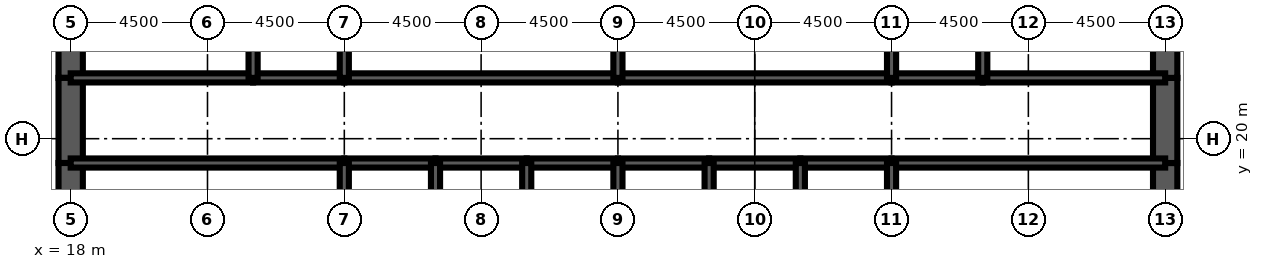
"""IFC4 building model, lengths in metres.
Left out: names, types, materials, properties, quantities, classifications, styles, units other than length and angle.
Written with IfcOpenShell. Run it as: python <this file> out.ifc"""

import sys

from ifc_helpers import new_model, si_unit, direction, frame, frame_2d, origin, place, context, subcontext, project, spatial, rectangle, extrude, element, fill, save


model = new_model("IFC4")
c1 = context("Model", 3, precision=1e-05, world=origin(), true_north=direction((0.0, 1.0)))
c2 = subcontext(c1, "Body", "Model", "MODEL_VIEW")
j1 = project(units=[si_unit("LENGTHUNIT", "METRE"), si_unit("PLANEANGLEUNIT", "RADIAN")], contexts=[c1])
p1 = place(None, origin())
s1 = spatial("IfcSite", under=j1, at=p1, CompositionType="ELEMENT")
p2 = place(p1, origin())
s2 = spatial("IfcBuilding", under=s1, at=p2, CompositionType="ELEMENT")
p3 = place(p2, frame((0.0, 0.0, 211.0)))
s3 = spatial("IfcBuildingStorey", under=s2, at=p3, CompositionType="ELEMENT", Elevation=211.0)
p4 = place(p3, frame((18.0, 26.0, 0.0), z_axis=(0.0, 0.0, 1.0), x_axis=(0.0, -1.0, 0.0)))
e1 = element("IfcWall", 1, at=p4, inside=s3, PredefinedType="SHEAR", context=c2, shape_type="SweptSolid", body=[
    extrude(rectangle(XDim=4.0, YDim=0.8, at=frame_2d((2.0, 0.0))), origin(), (0.0, 0.0, 1.0), 4.2),
])
p5 = place(p3, frame((18.0, 22.0, 0.0), z_axis=(0.0, 0.0, 1.0), x_axis=(0.0, -1.0, 0.0)))
e2 = element("IfcWall", 2, at=p5, inside=s3, PredefinedType="SHEAR", context=c2, shape_type="SweptSolid", body=[
    extrude(rectangle(XDim=2.8, YDim=0.8, at=frame_2d((1.4, 0.0))), origin(), (0.0, 0.0, 1.0), 4.2),
])
p6 = place(p5, frame((0.6, 0.0, 0.0)))
e3 = element("IfcOpeningElement", 3, at=p6, cuts=e2, PredefinedType="OPENING", context=c2, shape_type="SweptSolid", body=[
    extrude(rectangle(XDim=1.8, YDim=2.1, at=frame_2d((0.9, 1.05))), frame((0.0, 0.41, 0.0), z_axis=(0.0, -1.0, 0.0), x_axis=(1.0, 0.0, 0.0)), (0.0, 0.0, 1.0), 0.82),
])
for number, where, z_axis, x_axis in (
    (4, (18.0, 19.2, 0.0), (0.0, 0.0, 1.0), (0.0, -1.0, 0.0)),
    (5, (54.0, 16.0, 0.0), (0.0, 0.0, 1.0), (0.0, 1.0, 0.0)),
):
    element("IfcWall", number, at=place(p3, frame(where, z_axis=z_axis, x_axis=x_axis)), inside=s3, PredefinedType="SHEAR", context=c2, shape_type="SweptSolid", body=[
        extrude(rectangle(XDim=3.2, YDim=0.8, at=frame_2d((1.6, 0.0))), origin(), (0.0, 0.0, 1.0), 4.2),
    ])
p7 = place(p3, frame((54.0, 19.2, 0.0), z_axis=(0.0, 0.0, 1.0), x_axis=(0.0, 1.0, 0.0)))
e6 = element("IfcWall", 6, at=p7, inside=s3, PredefinedType="SHEAR", context=c2, shape_type="SweptSolid", body=[
    extrude(rectangle(XDim=2.8, YDim=0.8, at=frame_2d((1.4, 0.0))), origin(), (0.0, 0.0, 1.0), 4.2),
])
p8 = place(p7, frame((0.4, 0.0, 0.0)))
e7 = element("IfcOpeningElement", 7, at=p8, cuts=e6, PredefinedType="OPENING", context=c2, shape_type="SweptSolid", body=[
    extrude(rectangle(XDim=1.8, YDim=2.1, at=frame_2d((0.9, 1.05))), frame((0.0, 0.41, 0.0), z_axis=(0.0, -1.0, 0.0), x_axis=(1.0, 0.0, 0.0)), (0.0, 0.0, 1.0), 0.82),
])
p9 = place(p3, frame((54.0, 22.0, 0.0), z_axis=(0.0, 0.0, 1.0), x_axis=(0.0, 1.0, 0.0)))
e8 = element("IfcWall", 8, at=p9, inside=s3, PredefinedType="SHEAR", context=c2, shape_type="SweptSolid", body=[
    extrude(rectangle(XDim=4.0, YDim=0.8, at=frame_2d((2.0, 0.0))), origin(), (0.0, 0.0, 1.0), 4.2),
])
p10 = place(p3, frame((18.0, 19.2, 0.0), z_axis=(0.0, 0.0, 1.0), x_axis=(1.0, 0.0, 0.0)))
e9 = element("IfcWall", 9, at=p10, inside=s3, PredefinedType="SOLIDWALL", context=c2, shape_type="SweptSolid", body=[
    extrude(rectangle(XDim=9.0, YDim=0.3, at=frame_2d((4.5, 0.0))), origin(), (0.0, 0.0, 1.0), 4.2),
])
p11 = place(p10, frame((0.65, 0.0, 0.0)))
e10 = element("IfcOpeningElement", 10, at=p11, cuts=e9, PredefinedType="OPENING", context=c2, shape_type="SweptSolid", body=[
    extrude(rectangle(XDim=1.0, YDim=2.1, at=frame_2d((0.5, 1.05))), frame((0.0, 0.16, 0.0), z_axis=(0.0, -1.0, 0.0), x_axis=(1.0, 0.0, 0.0)), (0.0, 0.0, 1.0), 0.32),
])
p12 = place(p3, frame((27.0, 19.2, 0.0), z_axis=(0.0, 0.0, 1.0), x_axis=(1.0, 0.0, 0.0)))
e11 = element("IfcWall", 11, at=p12, inside=s3, PredefinedType="SOLIDWALL", context=c2, shape_type="SweptSolid", body=[
    extrude(rectangle(XDim=3.0, YDim=0.3, at=frame_2d((1.5, 0.0))), origin(), (0.0, 0.0, 1.0), 4.2),
])
p13 = place(p12, frame((0.95, 0.0, 0.0)))
e12 = element("IfcOpeningElement", 12, at=p13, cuts=e11, PredefinedType="OPENING", context=c2, shape_type="SweptSolid", body=[
    extrude(rectangle(XDim=1.1, YDim=2.2, at=frame_2d((0.55, 1.1))), frame((0.0, 0.16, 0.0), z_axis=(0.0, -1.0, 0.0), x_axis=(1.0, 0.0, 0.0)), (0.0, 0.0, 1.0), 0.32),
])
p14 = place(p3, frame((30.0, 19.2, 0.0), z_axis=(0.0, 0.0, 1.0), x_axis=(1.0, 0.0, 0.0)))
e13 = element("IfcWall", 13, at=p14, inside=s3, PredefinedType="SOLIDWALL", context=c2, shape_type="SweptSolid", body=[
    extrude(rectangle(XDim=3.0, YDim=0.3, at=frame_2d((1.5, 0.0))), origin(), (0.0, 0.0, 1.0), 4.2),
])
p15 = place(p14, frame((0.95, 0.0, 0.0)))
e14 = element("IfcOpeningElement", 14, at=p15, cuts=e13, PredefinedType="OPENING", context=c2, shape_type="SweptSolid", body=[
    extrude(rectangle(XDim=1.1, YDim=2.2, at=frame_2d((0.55, 1.1))), frame((0.0, 0.16, 0.0), z_axis=(0.0, -1.0, 0.0), x_axis=(1.0, 0.0, 0.0)), (0.0, 0.0, 1.0), 0.32),
])
p16 = place(p3, frame((33.0, 19.2, 0.0), z_axis=(0.0, 0.0, 1.0), x_axis=(1.0, 0.0, 0.0)))
e15 = element("IfcWall", 15, at=p16, inside=s3, PredefinedType="SOLIDWALL", context=c2, shape_type="SweptSolid", body=[
    extrude(rectangle(XDim=3.0, YDim=0.3, at=frame_2d((1.5, 0.0))), origin(), (0.0, 0.0, 1.0), 4.2),
])
p17 = place(p16, frame((0.95, 0.0, 0.0)))
e16 = element("IfcOpeningElement", 16, at=p17, cuts=e15, PredefinedType="OPENING", context=c2, shape_type="SweptSolid", body=[
    extrude(rectangle(XDim=1.1, YDim=2.2, at=frame_2d((0.55, 1.1))), frame((0.0, 0.16, 0.0), z_axis=(0.0, -1.0, 0.0), x_axis=(1.0, 0.0, 0.0)), (0.0, 0.0, 1.0), 0.32),
])
p18 = place(p3, frame((36.0, 19.2, 0.0), z_axis=(0.0, 0.0, 1.0), x_axis=(1.0, 0.0, 0.0)))
e17 = element("IfcWall", 17, at=p18, inside=s3, PredefinedType="SOLIDWALL", context=c2, shape_type="SweptSolid", body=[
    extrude(rectangle(XDim=3.0, YDim=0.3, at=frame_2d((1.5, 0.0))), origin(), (0.0, 0.0, 1.0), 4.2),
])
p19 = place(p18, frame((0.95, 0.0, 0.0)))
e18 = element("IfcOpeningElement", 18, at=p19, cuts=e17, PredefinedType="OPENING", context=c2, shape_type="SweptSolid", body=[
    extrude(rectangle(XDim=1.1, YDim=2.2, at=frame_2d((0.55, 1.1))), frame((0.0, 0.16, 0.0), z_axis=(0.0, -1.0, 0.0), x_axis=(1.0, 0.0, 0.0)), (0.0, 0.0, 1.0), 0.32),
])
p20 = place(p3, frame((39.0, 19.2, 0.0), z_axis=(0.0, 0.0, 1.0), x_axis=(1.0, 0.0, 0.0)))
e19 = element("IfcWall", 19, at=p20, inside=s3, PredefinedType="SOLIDWALL", context=c2, shape_type="SweptSolid", body=[
    extrude(rectangle(XDim=3.0, YDim=0.3, at=frame_2d((1.5, 0.0))), origin(), (0.0, 0.0, 1.0), 4.2),
])
p21 = place(p20, frame((1.0, 0.0, 0.0)))
e20 = element("IfcOpeningElement", 20, at=p21, cuts=e19, PredefinedType="OPENING", context=c2, shape_type="SweptSolid", body=[
    extrude(rectangle(XDim=1.0, YDim=2.1, at=frame_2d((0.5, 1.05))), frame((0.0, 0.16, 0.0), z_axis=(0.0, -1.0, 0.0), x_axis=(1.0, 0.0, 0.0)), (0.0, 0.0, 1.0), 0.32),
])
p22 = place(p3, frame((42.0, 19.2, 0.0), z_axis=(0.0, 0.0, 1.0), x_axis=(1.0, 0.0, 0.0)))
e21 = element("IfcWall", 21, at=p22, inside=s3, PredefinedType="SOLIDWALL", context=c2, shape_type="SweptSolid", body=[
    extrude(rectangle(XDim=3.0, YDim=0.3, at=frame_2d((1.5, 0.0))), origin(), (0.0, 0.0, 1.0), 4.2),
])
p23 = place(p22, frame((1.0, 0.0, 0.0)))
e22 = element("IfcOpeningElement", 22, at=p23, cuts=e21, PredefinedType="OPENING", context=c2, shape_type="SweptSolid", body=[
    extrude(rectangle(XDim=1.0, YDim=2.1, at=frame_2d((0.5, 1.05))), frame((0.0, 0.16, 0.0), z_axis=(0.0, -1.0, 0.0), x_axis=(1.0, 0.0, 0.0)), (0.0, 0.0, 1.0), 0.32),
])
p24 = place(p3, frame((45.0, 19.2, 0.0), z_axis=(0.0, 0.0, 1.0), x_axis=(1.0, 0.0, 0.0)))
e23 = element("IfcWall", 23, at=p24, inside=s3, PredefinedType="SOLIDWALL", context=c2, shape_type="SweptSolid", body=[
    extrude(rectangle(XDim=9.0, YDim=0.3, at=frame_2d((4.5, 0.0))), origin(), (0.0, 0.0, 1.0), 4.2),
])
p25 = place(p24, frame((7.35, 0.0, 0.0)))
e24 = element("IfcOpeningElement", 24, at=p25, cuts=e23, PredefinedType="OPENING", context=c2, shape_type="SweptSolid", body=[
    extrude(rectangle(XDim=1.0, YDim=2.1, at=frame_2d((0.5, 1.05))), frame((0.0, 0.16, 0.0), z_axis=(0.0, -1.0, 0.0), x_axis=(1.0, 0.0, 0.0)), (0.0, 0.0, 1.0), 0.32),
])
p26 = place(p3, frame((18.0, 22.0, 0.0), z_axis=(0.0, 0.0, 1.0), x_axis=(1.0, 0.0, 0.0)))
e25 = element("IfcWall", 25, at=p26, inside=s3, PredefinedType="SOLIDWALL", context=c2, shape_type="SweptSolid", body=[
    extrude(rectangle(XDim=6.0, YDim=0.3, at=frame_2d((3.0, 0.0))), origin(), (0.0, 0.0, 1.0), 4.2),
])
p27 = place(p26, frame((2.0, 0.0, 0.0)))
e26 = element("IfcOpeningElement", 26, at=p27, cuts=e25, PredefinedType="OPENING", context=c2, shape_type="SweptSolid", body=[
    extrude(rectangle(XDim=1.0, YDim=2.1, at=frame_2d((0.5, 1.05))), frame((0.0, 0.16, 0.0), z_axis=(0.0, -1.0, 0.0), x_axis=(1.0, 0.0, 0.0)), (0.0, 0.0, 1.0), 0.32),
])
p28 = place(p3, frame((24.0, 22.0, 0.0), z_axis=(0.0, 0.0, 1.0), x_axis=(1.0, 0.0, 0.0)))
e27 = element("IfcWall", 27, at=p28, inside=s3, PredefinedType="SOLIDWALL", context=c2, shape_type="SweptSolid", body=[
    extrude(rectangle(XDim=3.0, YDim=0.3, at=frame_2d((1.5, 0.0))), origin(), (0.0, 0.0, 1.0), 4.2),
])
p29 = place(p28, frame((1.0, 0.0, 0.0)))
e28 = element("IfcOpeningElement", 28, at=p29, cuts=e27, PredefinedType="OPENING", context=c2, shape_type="SweptSolid", body=[
    extrude(rectangle(XDim=1.0, YDim=2.1, at=frame_2d((0.5, 1.05))), frame((0.0, 0.16, 0.0), z_axis=(0.0, -1.0, 0.0), x_axis=(1.0, 0.0, 0.0)), (0.0, 0.0, 1.0), 0.32),
])
p30 = place(p3, frame((27.0, 22.0, 0.0), z_axis=(0.0, 0.0, 1.0), x_axis=(1.0, 0.0, 0.0)))
e29 = element("IfcWall", 29, at=p30, inside=s3, PredefinedType="SOLIDWALL", context=c2, shape_type="SweptSolid", body=[
    extrude(rectangle(XDim=9.0, YDim=0.3, at=frame_2d((4.5, 0.0))), origin(), (0.0, 0.0, 1.0), 4.2),
])
p31 = place(p30, frame((4.0, 0.0, 0.0)))
e30 = element("IfcOpeningElement", 30, at=p31, cuts=e29, PredefinedType="OPENING", context=c2, shape_type="SweptSolid", body=[
    extrude(rectangle(XDim=1.0, YDim=2.1, at=frame_2d((0.5, 1.05))), frame((0.0, 0.16, 0.0), z_axis=(0.0, -1.0, 0.0), x_axis=(1.0, 0.0, 0.0)), (0.0, 0.0, 1.0), 0.32),
])
p32 = place(p3, frame((36.0, 22.0, 0.0), z_axis=(0.0, 0.0, 1.0), x_axis=(1.0, 0.0, 0.0)))
e31 = element("IfcWall", 31, at=p32, inside=s3, PredefinedType="SOLIDWALL", context=c2, shape_type="SweptSolid", body=[
    extrude(rectangle(XDim=9.0, YDim=0.3, at=frame_2d((4.5, 0.0))), origin(), (0.0, 0.0, 1.0), 4.2),
])
p33 = place(p32, frame((4.0, 0.0, 0.0)))
e32 = element("IfcOpeningElement", 32, at=p33, cuts=e31, PredefinedType="OPENING", context=c2, shape_type="SweptSolid", body=[
    extrude(rectangle(XDim=1.0, YDim=2.1, at=frame_2d((0.5, 1.05))), frame((0.0, 0.16, 0.0), z_axis=(0.0, -1.0, 0.0), x_axis=(1.0, 0.0, 0.0)), (0.0, 0.0, 1.0), 0.32),
])
p34 = place(p3, frame((45.0, 22.0, 0.0), z_axis=(0.0, 0.0, 1.0), x_axis=(1.0, 0.0, 0.0)))
e33 = element("IfcWall", 33, at=p34, inside=s3, PredefinedType="SOLIDWALL", context=c2, shape_type="SweptSolid", body=[
    extrude(rectangle(XDim=3.0, YDim=0.3, at=frame_2d((1.5, 0.0))), origin(), (0.0, 0.0, 1.0), 4.2),
])
p35 = place(p34, frame((1.0, 0.0, 0.0)))
e34 = element("IfcOpeningElement", 34, at=p35, cuts=e33, PredefinedType="OPENING", context=c2, shape_type="SweptSolid", body=[
    extrude(rectangle(XDim=1.0, YDim=2.1, at=frame_2d((0.5, 1.05))), frame((0.0, 0.16, 0.0), z_axis=(0.0, -1.0, 0.0), x_axis=(1.0, 0.0, 0.0)), (0.0, 0.0, 1.0), 0.32),
])
p36 = place(p3, frame((48.0, 22.0, 0.0), z_axis=(0.0, 0.0, 1.0), x_axis=(1.0, 0.0, 0.0)))
e35 = element("IfcWall", 35, at=p36, inside=s3, PredefinedType="SOLIDWALL", context=c2, shape_type="SweptSolid", body=[
    extrude(rectangle(XDim=6.0, YDim=0.3, at=frame_2d((3.0, 0.0))), origin(), (0.0, 0.0, 1.0), 4.2),
])
p37 = place(p36, frame((2.0, 0.0, 0.0)))
e36 = element("IfcOpeningElement", 36, at=p37, cuts=e35, PredefinedType="OPENING", context=c2, shape_type="SweptSolid", body=[
    extrude(rectangle(XDim=1.0, YDim=2.1, at=frame_2d((0.5, 1.05))), frame((0.0, 0.16, 0.0), z_axis=(0.0, -1.0, 0.0), x_axis=(1.0, 0.0, 0.0)), (0.0, 0.0, 1.0), 0.32),
])
p38 = place(p36, frame((4.2, 0.0, 0.0)))
e37 = element("IfcOpeningElement", 37, at=p38, cuts=e35, PredefinedType="OPENING", context=c2, shape_type="SweptSolid", body=[
    extrude(rectangle(XDim=1.0, YDim=2.1, at=frame_2d((0.5, 1.05))), frame((0.0, 0.16, 0.0), z_axis=(0.0, -1.0, 0.0), x_axis=(1.0, 0.0, 0.0)), (0.0, 0.0, 1.0), 0.32),
])
for number, where, z_axis, x_axis in (
    (38, (27.0, 16.0, 0.0), (0.0, 0.0, 1.0), (0.0, 1.0, 0.0)),
    (39, (30.0, 16.0, 0.0), (0.0, 0.0, 1.0), (0.0, 1.0, 0.0)),
    (40, (33.0, 16.0, 0.0), (0.0, 0.0, 1.0), (0.0, 1.0, 0.0)),
    (41, (36.0, 16.0, 0.0), (0.0, 0.0, 1.0), (0.0, 1.0, 0.0)),
    (42, (39.0, 16.0, 0.0), (0.0, 0.0, 1.0), (0.0, 1.0, 0.0)),
    (43, (42.0, 16.0, 0.0), (0.0, 0.0, 1.0), (0.0, 1.0, 0.0)),
    (44, (45.0, 16.0, 0.0), (0.0, 0.0, 1.0), (0.0, 1.0, 0.0)),
):
    element("IfcWall", number, at=place(p3, frame(where, z_axis=z_axis, x_axis=x_axis)), inside=s3, PredefinedType="SOLIDWALL", context=c2, shape_type="SweptSolid", body=[
        extrude(rectangle(XDim=3.2, YDim=0.3, at=frame_2d((1.6, 0.0))), origin(), (0.0, 0.0, 1.0), 4.2),
    ])
for number, where, z_axis, x_axis in (
    (45, (24.0, 22.0, 0.0), (0.0, 0.0, 1.0), (0.0, 1.0, 0.0)),
    (46, (27.0, 22.0, 0.0), (0.0, 0.0, 1.0), (0.0, 1.0, 0.0)),
    (47, (36.0, 22.0, 0.0), (0.0, 0.0, 1.0), (0.0, 1.0, 0.0)),
    (48, (45.0, 22.0, 0.0), (0.0, 0.0, 1.0), (0.0, 1.0, 0.0)),
    (49, (48.0, 22.0, 0.0), (0.0, 0.0, 1.0), (0.0, 1.0, 0.0)),
):
    element("IfcWall", number, at=place(p3, frame(where, z_axis=z_axis, x_axis=x_axis)), inside=s3, PredefinedType="SOLIDWALL", context=c2, shape_type="SweptSolid", body=[
        extrude(rectangle(XDim=4.0, YDim=0.3, at=frame_2d((2.0, 0.0))), origin(), (0.0, 0.0, 1.0), 4.2),
    ])
p39 = place(p3, frame((51.725, 22.15, 0.0), z_axis=(0.0, 0.0, 1.0), x_axis=(0.0, 1.0, 0.0)))
e50 = element("IfcWall", 50, at=p39, inside=s3, PredefinedType="PARTITIONING", context=c2, shape_type="SweptSolid", body=[
    extrude(rectangle(XDim=3.7, YDim=0.15, at=frame_2d((1.85, 0.0))), origin(), (0.0, 0.0, 1.0), 3.0),
])
p40 = place(p13, origin())
e51 = element("IfcDoor", 51, at=p40, inside=s3, OperationType="DOUBLE_DOOR_SLIDING", PredefinedType="USERDEFINED", context=c2, shape_type="SweptSolid", body=[
    extrude(rectangle(XDim=1.1, YDim=2.2, at=frame_2d((0.55, 1.1))), frame((0.0, 0.025, 0.0), z_axis=(0.0, -1.0, 0.0), x_axis=(1.0, 0.0, 0.0)), (0.0, 0.0, 1.0), 0.05),
])
fill(e12, e51)
p41 = place(p15, origin())
e52 = element("IfcDoor", 52, at=p41, inside=s3, OperationType="DOUBLE_DOOR_SLIDING", PredefinedType="USERDEFINED", context=c2, shape_type="SweptSolid", body=[
    extrude(rectangle(XDim=1.1, YDim=2.2, at=frame_2d((0.55, 1.1))), frame((0.0, 0.025, 0.0), z_axis=(0.0, -1.0, 0.0), x_axis=(1.0, 0.0, 0.0)), (0.0, 0.0, 1.0), 0.05),
])
fill(e14, e52)
p42 = place(p17, origin())
e53 = element("IfcDoor", 53, at=p42, inside=s3, OperationType="DOUBLE_DOOR_SLIDING", PredefinedType="USERDEFINED", context=c2, shape_type="SweptSolid", body=[
    extrude(rectangle(XDim=1.1, YDim=2.2, at=frame_2d((0.55, 1.1))), frame((0.0, 0.025, 0.0), z_axis=(0.0, -1.0, 0.0), x_axis=(1.0, 0.0, 0.0)), (0.0, 0.0, 1.0), 0.05),
])
fill(e16, e53)
p43 = place(p19, origin())
e54 = element("IfcDoor", 54, at=p43, inside=s3, OperationType="DOUBLE_DOOR_SLIDING", PredefinedType="USERDEFINED", context=c2, shape_type="SweptSolid", body=[
    extrude(rectangle(XDim=1.1, YDim=2.2, at=frame_2d((0.55, 1.1))), frame((0.0, 0.025, 0.0), z_axis=(0.0, -1.0, 0.0), x_axis=(1.0, 0.0, 0.0)), (0.0, 0.0, 1.0), 0.05),
])
fill(e18, e54)
p44 = place(p11, origin())
e55 = element("IfcDoor", 55, at=p44, inside=s3, OperationType="SINGLE_SWING_LEFT", PredefinedType="DOOR", context=c2, shape_type="SweptSolid", body=[
    extrude(rectangle(XDim=1.0, YDim=2.1, at=frame_2d((0.5, 1.05))), frame((0.0, 0.025, 0.0), z_axis=(0.0, -1.0, 0.0), x_axis=(1.0, 0.0, 0.0)), (0.0, 0.0, 1.0), 0.05),
])
fill(e10, e55)
p45 = place(p25, origin())
e56 = element("IfcDoor", 56, at=p45, inside=s3, OperationType="SINGLE_SWING_RIGHT", PredefinedType="DOOR", context=c2, shape_type="SweptSolid", body=[
    extrude(rectangle(XDim=1.0, YDim=2.1, at=frame_2d((0.5, 1.05))), frame((0.0, 0.025, 0.0), z_axis=(0.0, -1.0, 0.0), x_axis=(1.0, 0.0, 0.0)), (0.0, 0.0, 1.0), 0.05),
])
fill(e24, e56)
p46 = place(p6, origin())
e57 = element("IfcDoor", 57, at=p46, inside=s3, OperationType="SINGLE_SWING_LEFT", PredefinedType="DOOR", context=c2, shape_type="SweptSolid", body=[
    extrude(rectangle(XDim=1.8, YDim=2.1, at=frame_2d((0.9, 1.05))), frame((0.0, 0.4, 0.0), z_axis=(0.0, -1.0, 0.0), x_axis=(1.0, 0.0, 0.0)), (0.0, 0.0, 1.0), 0.8),
])
fill(e3, e57)
p47 = place(p8, origin())
e58 = element("IfcDoor", 58, at=p47, inside=s3, OperationType="SINGLE_SWING_LEFT", PredefinedType="DOOR", context=c2, shape_type="SweptSolid", body=[
    extrude(rectangle(XDim=1.8, YDim=2.1, at=frame_2d((0.9, 1.05))), frame((0.0, 0.4, 0.0), z_axis=(0.0, -1.0, 0.0), x_axis=(1.0, 0.0, 0.0)), (0.0, 0.0, 1.0), 0.8),
])
fill(e7, e58)
p48 = place(p27, origin())
e59 = element("IfcDoor", 59, at=p48, inside=s3, OperationType="SINGLE_SWING_LEFT", PredefinedType="DOOR", context=c2, shape_type="SweptSolid", body=[
    extrude(rectangle(XDim=1.0, YDim=2.1, at=frame_2d((0.5, 1.05))), frame((0.0, 0.025, 0.0), z_axis=(0.0, -1.0, 0.0), x_axis=(1.0, 0.0, 0.0)), (0.0, 0.0, 1.0), 0.05),
])
fill(e26, e59)
p49 = place(p29, origin())
e60 = element("IfcDoor", 60, at=p49, inside=s3, OperationType="SINGLE_SWING_LEFT", PredefinedType="DOOR", context=c2, shape_type="SweptSolid", body=[
    extrude(rectangle(XDim=1.0, YDim=2.1, at=frame_2d((0.5, 1.05))), frame((0.0, 0.025, 0.0), z_axis=(0.0, -1.0, 0.0), x_axis=(1.0, 0.0, 0.0)), (0.0, 0.0, 1.0), 0.05),
])
fill(e28, e60)
p50 = place(p31, origin())
e61 = element("IfcDoor", 61, at=p50, inside=s3, OperationType="SINGLE_SWING_LEFT", PredefinedType="DOOR", context=c2, shape_type="SweptSolid", body=[
    extrude(rectangle(XDim=1.0, YDim=2.1, at=frame_2d((0.5, 1.05))), frame((0.0, 0.025, 0.0), z_axis=(0.0, -1.0, 0.0), x_axis=(1.0, 0.0, 0.0)), (0.0, 0.0, 1.0), 0.05),
])
fill(e30, e61)
p51 = place(p33, origin())
e62 = element("IfcDoor", 62, at=p51, inside=s3, OperationType="SINGLE_SWING_LEFT", PredefinedType="DOOR", context=c2, shape_type="SweptSolid", body=[
    extrude(rectangle(XDim=1.0, YDim=2.1, at=frame_2d((0.5, 1.05))), frame((0.0, 0.025, 0.0), z_axis=(0.0, -1.0, 0.0), x_axis=(1.0, 0.0, 0.0)), (0.0, 0.0, 1.0), 0.05),
])
fill(e32, e62)
p52 = place(p35, origin())
e63 = element("IfcDoor", 63, at=p52, inside=s3, OperationType="SINGLE_SWING_LEFT", PredefinedType="DOOR", context=c2, shape_type="SweptSolid", body=[
    extrude(rectangle(XDim=1.0, YDim=2.1, at=frame_2d((0.5, 1.05))), frame((0.0, 0.025, 0.0), z_axis=(0.0, -1.0, 0.0), x_axis=(1.0, 0.0, 0.0)), (0.0, 0.0, 1.0), 0.05),
])
fill(e34, e63)
p53 = place(p37, origin())
e64 = element("IfcDoor", 64, at=p53, inside=s3, OperationType="SINGLE_SWING_LEFT", PredefinedType="DOOR", context=c2, shape_type="SweptSolid", body=[
    extrude(rectangle(XDim=1.0, YDim=2.1, at=frame_2d((0.5, 1.05))), frame((0.0, 0.025, 0.0), z_axis=(0.0, -1.0, 0.0), x_axis=(1.0, 0.0, 0.0)), (0.0, 0.0, 1.0), 0.05),
])
fill(e36, e64)
p54 = place(p38, origin())
e65 = element("IfcDoor", 65, at=p54, inside=s3, OperationType="SINGLE_SWING_RIGHT", PredefinedType="DOOR", context=c2, shape_type="SweptSolid", body=[
    extrude(rectangle(XDim=1.0, YDim=2.1, at=frame_2d((0.5, 1.05))), frame((0.0, 0.025, 0.0), z_axis=(0.0, -1.0, 0.0), x_axis=(1.0, 0.0, 0.0)), (0.0, 0.0, 1.0), 0.05),
])
fill(e37, e65)
p55 = place(p21, origin())
e66 = element("IfcDoor", 66, at=p55, inside=s3, OperationType="SINGLE_SWING_LEFT", PredefinedType="DOOR", context=c2, shape_type="SweptSolid", body=[
    extrude(rectangle(XDim=1.0, YDim=2.1, at=frame_2d((0.5, 1.05))), frame((0.0, 0.025, 0.0), z_axis=(0.0, -1.0, 0.0), x_axis=(1.0, 0.0, 0.0)), (0.0, 0.0, 1.0), 0.05),
])
fill(e20, e66)
p56 = place(p23, origin())
e67 = element("IfcDoor", 67, at=p56, inside=s3, OperationType="SINGLE_SWING_LEFT", PredefinedType="DOOR", context=c2, shape_type="SweptSolid", body=[
    extrude(rectangle(XDim=1.0, YDim=2.1, at=frame_2d((0.5, 1.05))), frame((0.0, 0.025, 0.0), z_axis=(0.0, -1.0, 0.0), x_axis=(1.0, 0.0, 0.0)), (0.0, 0.0, 1.0), 0.05),
])
fill(e22, e67)
save(model, sys.argv[1])
